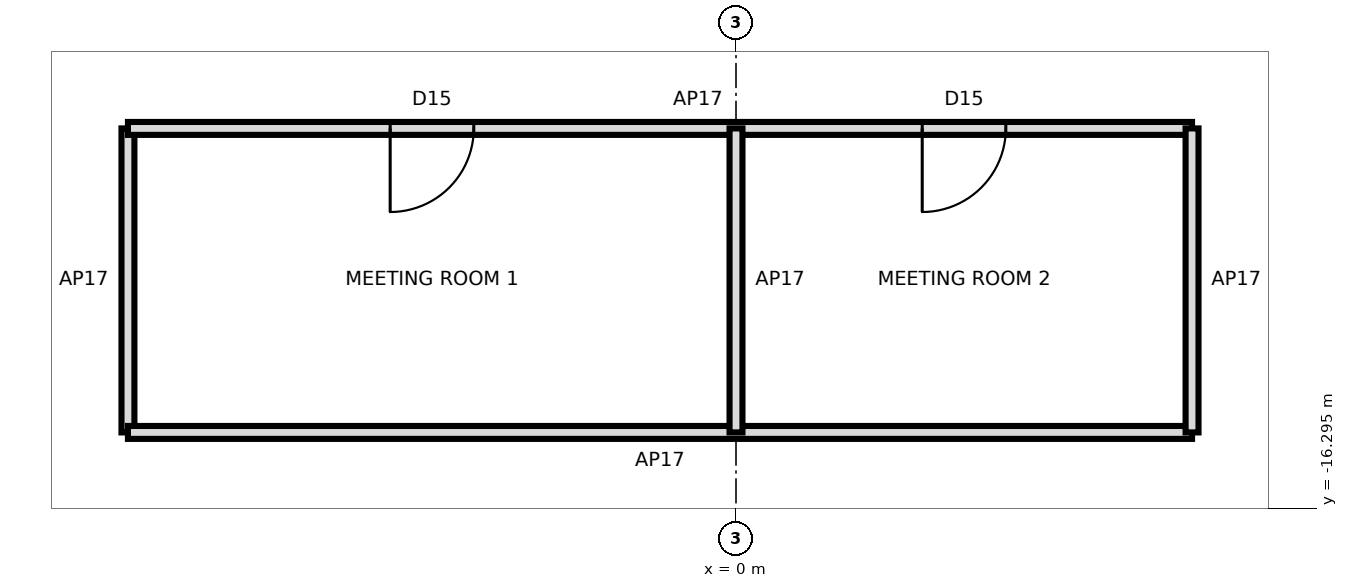
"""IFC4 building model, lengths in metres.
Left out: names, types, materials, properties, quantities, classifications, styles, units other than length and angle.
Written with IfcOpenShell. Run it as: python <this file> out.ifc"""

import sys

from ifc_helpers import new_model, si_unit, direction, frame, frame_2d, origin, place, context, subcontext, project, spatial, rectangle, extrude, element, fill, save


model = new_model("IFC4")
c1 = context("Model", 3, precision=1e-05, world=origin(), true_north=direction((0.0, 1.0)))
c2 = subcontext(c1, "Body", "Model", "MODEL_VIEW")
j1 = project(units=[si_unit("LENGTHUNIT", "METRE"), si_unit("PLANEANGLEUNIT", "RADIAN")], contexts=[c1])
p1 = place(None, origin())
s1 = spatial("IfcSite", under=j1, at=p1, CompositionType="ELEMENT")
p2 = place(p1, origin())
s2 = spatial("IfcBuilding", under=s1, at=p2, CompositionType="ELEMENT")
p3 = place(p2, frame((0.0, 0.0, 272.8)))
s3 = spatial("IfcBuildingStorey", under=s2, at=p3, CompositionType="ELEMENT", Elevation=272.8)
p4 = place(p3, frame((-8.0, -15.3, 0.0), z_axis=(0.0, 0.0, 1.0), x_axis=(0.0, 1.0, 0.0)))
e1 = element("IfcWall", 1, at=p4, inside=s3, PredefinedType="PARTITIONING", context=c2, shape_type="SweptSolid", body=[
    extrude(rectangle(XDim=4.0, YDim=0.17, at=frame_2d((2.0, 0.0))), origin(), (0.0, 0.0, 1.0), 4.0),
])
p5 = place(p3, frame((-8.0, -11.3, 0.0), z_axis=(0.0, 0.0, 1.0), x_axis=(1.0, 0.0, 0.0)))
e2 = element("IfcWall", 2, at=p5, inside=s3, PredefinedType="PARTITIONING", context=c2, shape_type="SweptSolid", body=[
    extrude(rectangle(XDim=14.0, YDim=0.17, at=frame_2d((7.0, 0.0))), origin(), (0.0, 0.0, 1.0), 4.0),
])
p6 = place(p5, frame((3.45, 0.0, 0.0)))
e3 = element("IfcOpeningElement", 3, at=p6, cuts=e2, PredefinedType="OPENING", context=c2, shape_type="SweptSolid", body=[
    extrude(rectangle(XDim=1.1, YDim=2.4, at=frame_2d((0.55, 1.2))), frame((0.0, 0.095, 0.0), z_axis=(0.0, -1.0, 0.0), x_axis=(1.0, 0.0, 0.0)), (0.0, 0.0, 1.0), 0.19),
])
p7 = place(p5, frame((10.45, 0.0, 0.0)))
e4 = element("IfcOpeningElement", 4, at=p7, cuts=e2, PredefinedType="OPENING", context=c2, shape_type="SweptSolid", body=[
    extrude(rectangle(XDim=1.1, YDim=2.4, at=frame_2d((0.55, 1.2))), frame((0.0, 0.095, 0.0), z_axis=(0.0, -1.0, 0.0), x_axis=(1.0, 0.0, 0.0)), (0.0, 0.0, 1.0), 0.19),
])
p8 = place(p3, frame((6.0, -15.3, 0.0), z_axis=(0.0, 0.0, 1.0), x_axis=(-1.0, 0.0, 0.0)))
e5 = element("IfcWall", 5, at=p8, inside=s3, PredefinedType="PARTITIONING", context=c2, shape_type="SweptSolid", body=[
    extrude(rectangle(XDim=14.0, YDim=0.17, at=frame_2d((7.0, 0.0))), origin(), (0.0, 0.0, 1.0), 3.546),
])
p9 = place(p3, frame((0.0, -11.3, 0.0), z_axis=(0.0, 0.0, 1.0), x_axis=(0.0, -1.0, 0.0)))
e6 = element("IfcWall", 6, at=p9, inside=s3, PredefinedType="PARTITIONING", context=c2, shape_type="SweptSolid", body=[
    extrude(rectangle(XDim=4.0, YDim=0.17, at=frame_2d((2.0, 0.0))), origin(), (0.0, 0.0, 1.0), 3.1),
])
p10 = place(p3, frame((6.0, -11.3, 0.0), z_axis=(0.0, 0.0, 1.0), x_axis=(0.0, -1.0, 0.0)))
e7 = element("IfcWall", 7, at=p10, inside=s3, PredefinedType="PARTITIONING", context=c2, shape_type="SweptSolid", body=[
    extrude(rectangle(XDim=4.0, YDim=0.17, at=frame_2d((2.0, 0.0))), origin(), (0.0, 0.0, 1.0), 4.0),
])
p11 = place(p6, frame((1.1, 0.0, 0.0), z_axis=(0.0, 0.0, 1.0), x_axis=(-1.0, 0.0, 0.0)))
e8 = element("IfcDoor", 8, at=p11, inside=s3, OperationType="SINGLE_SWING_RIGHT", PredefinedType="DOOR", context=c2, shape_type="SweptSolid", body=[
    extrude(rectangle(XDim=1.1, YDim=2.4, at=frame_2d((0.55, 1.2))), frame((0.0, 0.025, 0.0), z_axis=(0.0, -1.0, 0.0), x_axis=(1.0, 0.0, 0.0)), (0.0, 0.0, 1.0), 0.05),
])
fill(e3, e8)
p12 = place(p7, frame((1.1, 0.0, 0.0), z_axis=(0.0, 0.0, 1.0), x_axis=(-1.0, 0.0, 0.0)))
e9 = element("IfcDoor", 9, at=p12, inside=s3, OperationType="SINGLE_SWING_RIGHT", PredefinedType="DOOR", context=c2, shape_type="SweptSolid", body=[
    extrude(rectangle(XDim=1.1, YDim=2.4, at=frame_2d((0.55, 1.2))), frame((0.0, 0.025, 0.0), z_axis=(0.0, -1.0, 0.0), x_axis=(1.0, 0.0, 0.0)), (0.0, 0.0, 1.0), 0.05),
])
fill(e4, e9)
save(model, sys.argv[1])
